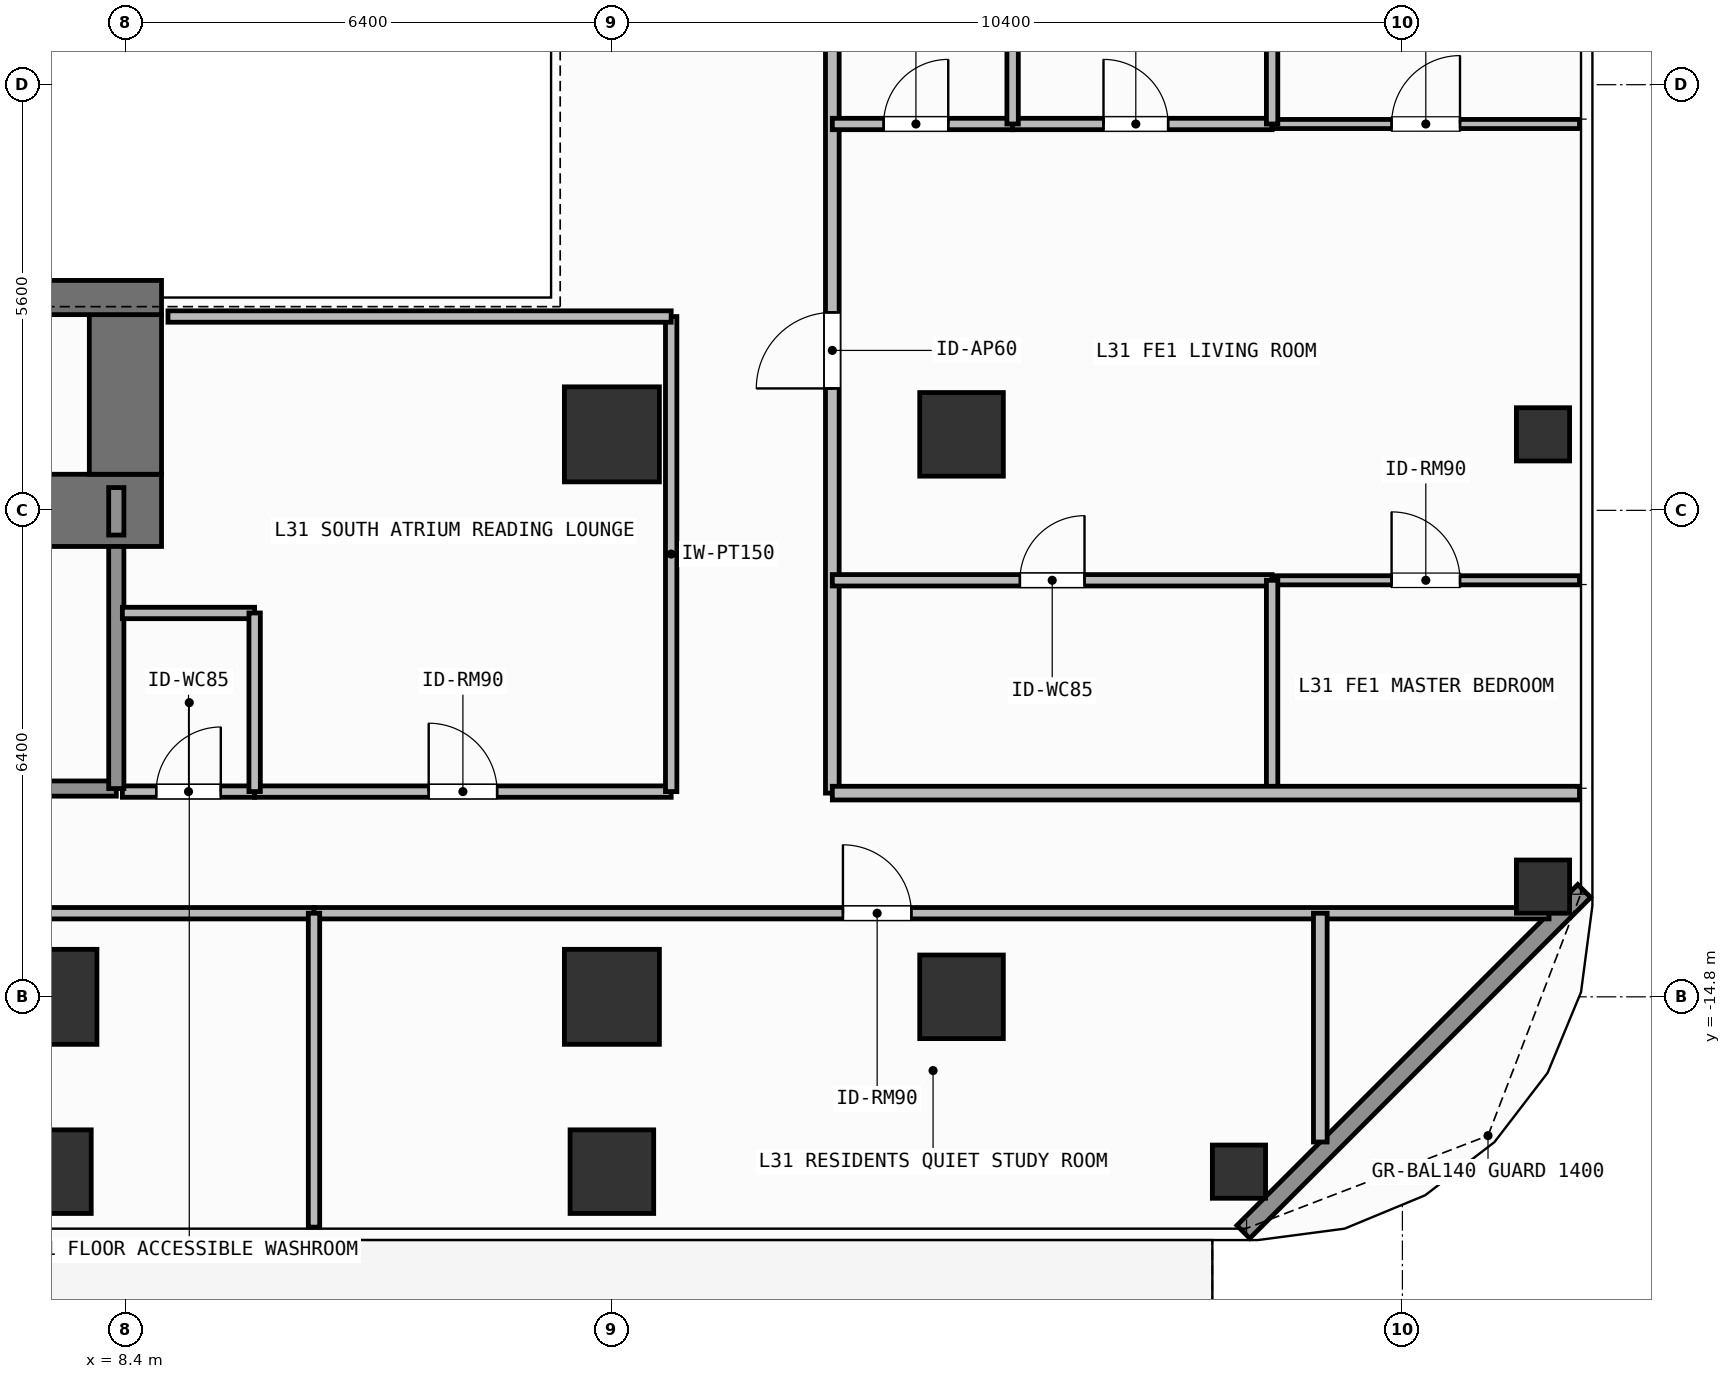
"""IFC4 building model, lengths in metres.
Left out: names, types, materials, properties, quantities, classifications, styles, units other than length and angle.
Written with IfcOpenShell. Run it as: python <this file> out.ifc"""

import sys

from ifc_helpers import new_model, si_unit, direction, frame, frame_2d, origin, origin_2d, place, context, subcontext, project, spatial, rectangle, hollow_rectangle, extrude, element, fill, save


model = new_model("IFC4")
c1 = context("Model", 3, precision=1e-05, world=origin(), true_north=direction((0.0, 1.0)))
c2 = subcontext(c1, "Body", "Model", "MODEL_VIEW")
j1 = project(units=[si_unit("LENGTHUNIT", "METRE"), si_unit("PLANEANGLEUNIT", "RADIAN")], contexts=[c1])
p1 = place(None, origin())
s1 = spatial("IfcSite", under=j1, at=p1, CompositionType="ELEMENT")
p2 = place(p1, origin())
s2 = spatial("IfcBuilding", under=s1, at=p2, CompositionType="ELEMENT")
p3 = place(p2, frame((0.0, 0.0, 125.1)))
s3 = spatial("IfcBuildingStorey", under=s2, at=p3, CompositionType="ELEMENT", Elevation=125.1)
p4 = place(p3, frame((6.12, -8.4, 0.0), z_axis=(0.0, 0.0, 1.0), x_axis=(1.0, 0.0, 0.0)))
e1 = element("IfcWall", 1, at=p4, inside=s3, PredefinedType="SHEAR", context=c2, shape_type="SweptSolid", body=[
    extrude(rectangle(XDim=2.755, YDim=0.95, at=frame_2d((1.377, 0.0))), origin(), (0.0, 0.0, 1.0), 3.9),
])
p5 = place(p3, frame((8.4, -7.925, 0.0), z_axis=(0.0, 0.0, 1.0), x_axis=(0.0, 1.0, 0.0)))
e2 = element("IfcWall", 2, at=p5, inside=s3, PredefinedType="SHEAR", context=c2, shape_type="SweptSolid", body=[
    extrude(rectangle(XDim=2.1, YDim=0.95, at=frame_2d((1.05, 0.0))), origin(), (0.0, 0.0, 1.0), 3.9),
])
p6 = place(p3, frame((3.045, -5.6, 0.0), z_axis=(0.0, 0.0, 1.0), x_axis=(1.0, 0.0, 0.0)))
e3 = element("IfcWall", 3, at=p6, inside=s3, PredefinedType="SHEAR", context=c2, shape_type="SweptSolid", body=[
    extrude(rectangle(XDim=5.83, YDim=0.45, at=frame_2d((2.915, 0.0))), origin(), (0.0, 0.0, 1.0), 3.9),
])
for number, where, z_axis, x_axis in (
    (4, (7.4, -14.8, 0.0), (0.0, 0.0, 1.0), (1.0, 0.0, 0.0)),
    (5, (14.8, -14.8, 0.0), (0.0, 0.0, 1.0), (1.0, 0.0, 0.0)),
    (6, (14.8, -7.4, 0.0), (0.0, 0.0, 1.0), (1.0, 0.0, 0.0)),
):
    element("IfcColumn", number, at=place(p3, frame(where, z_axis=z_axis, x_axis=x_axis)), inside=s3, PredefinedType="COLUMN", context=c2, shape_type="SweptSolid", body=[
        extrude(rectangle(XDim=1.25, YDim=1.25, at=origin_2d()), origin(), (0.0, 0.0, 1.0), 3.9),
    ])
for number, where, z_axis, x_axis in (
    (7, (19.4, -14.8, 0.0), (0.0, 0.0, 1.0), (1.0, 0.0, 0.0)),
    (8, (19.4, -7.4, 0.0), (0.0, 0.0, 1.0), (1.0, 0.0, 0.0)),
    (9, (7.4, -17.1, 0.0), (0.0, 0.0, 1.0), (1.0, 0.0, 0.0)),
    (10, (14.8, -17.1, 0.0), (0.0, 0.0, 1.0), (1.0, 0.0, 0.0)),
):
    element("IfcColumn", number, at=place(p3, frame(where, z_axis=z_axis, x_axis=x_axis)), inside=s3, PredefinedType="COLUMN", context=c2, shape_type="SweptSolid", body=[
        extrude(rectangle(XDim=1.1, YDim=1.1, at=origin_2d()), origin(), (0.0, 0.0, 1.0), 3.9),
    ])
for number, where, z_axis, x_axis in (
    (11, (23.05, -17.1, 0.0), (0.0, 0.0, 1.0), (1.0, 0.0, 0.0)),
    (12, (27.05, -13.35, 0.0), (0.0, 0.0, 1.0), (1.0, 0.0, 0.0)),
    (13, (27.05, -7.4, 0.0), (0.0, 0.0, 1.0), (1.0, 0.0, 0.0)),
):
    element("IfcColumn", number, at=place(p3, frame(where, z_axis=z_axis, x_axis=x_axis)), inside=s3, PredefinedType="COLUMN", context=c2, shape_type="SweptSolid", body=[
        extrude(hollow_rectangle(XDim=0.7, YDim=0.7, WallThickness=0.032, at=origin_2d()), origin(), (0.0, 0.0, 1.0), 3.9),
    ])
p7 = place(p3, frame((27.592, -13.408, 0.0), z_axis=(0.0, 0.0, 1.0), x_axis=(-0.707106781187, -0.707106781187, 0.0)))
e14 = element("IfcWall", 14, at=p7, inside=s3, PredefinedType="SOLIDWALL", context=c2, shape_type="SweptSolid", body=[
    extrude(rectangle(XDim=6.342, YDim=0.24, at=frame_2d((3.171, 0.0))), origin(), (0.0, 0.0, 1.0), 3.68),
])
p8 = place(p3, frame((4.58, -12.06, 0.0), z_axis=(0.0, 0.0, 1.0), x_axis=(1.0, 0.0, 0.0)))
e15 = element("IfcWall", 15, at=p8, inside=s3, PredefinedType="SOLIDWALL", context=c2, shape_type="SweptSolid", body=[
    extrude(rectangle(XDim=3.7, YDim=0.2, at=frame_2d((1.85, 0.0))), origin(), (0.0, 0.0, 1.0), 3.68),
])
p9 = place(p8, frame((1.212, 0.0, 0.0)))
e16 = element("IfcOpeningElement", 16, at=p9, cuts=e15, PredefinedType="OPENING", context=c2, shape_type="SweptSolid", body=[
    extrude(rectangle(XDim=1.1, YDim=2.15, at=frame_2d((0.55, 1.075))), frame((0.0, 0.11, 0.0), z_axis=(0.0, -1.0, 0.0), x_axis=(1.0, 0.0, 0.0)), (0.0, 0.0, 1.0), 0.22),
])
p10 = place(p3, frame((8.36, -12.1, 0.0), z_axis=(0.0, 0.0, 1.0), x_axis=(1.0, 0.0, 0.0)))
e17 = element("IfcWall", 17, at=p10, inside=s3, PredefinedType="PARTITIONING", context=c2, shape_type="SweptSolid", body=[
    extrude(rectangle(XDim=1.74, YDim=0.15, at=frame_2d((0.87, 0.0))), origin(), (0.0, 0.0, 1.0), 3.68),
])
p11 = place(p10, frame((0.445, 0.0, 0.0)))
e18 = element("IfcOpeningElement", 18, at=p11, cuts=e17, PredefinedType="OPENING", context=c2, shape_type="SweptSolid", body=[
    extrude(rectangle(XDim=0.85, YDim=2.1, at=frame_2d((0.425, 1.05))), frame((0.0, 0.085, 0.0), z_axis=(0.0, -1.0, 0.0), x_axis=(1.0, 0.0, 0.0)), (0.0, 0.0, 1.0), 0.17),
])
p12 = place(p3, frame((10.1, -12.1, 0.0), z_axis=(0.0, 0.0, 1.0), x_axis=(1.0, 0.0, 0.0)))
e19 = element("IfcWall", 19, at=p12, inside=s3, PredefinedType="PARTITIONING", context=c2, shape_type="SweptSolid", body=[
    extrude(rectangle(XDim=5.48, YDim=0.15, at=frame_2d((2.74, 0.0))), origin(), (0.0, 0.0, 1.0), 3.68),
])
p13 = place(p12, frame((2.29, 0.0, 0.0)))
e20 = element("IfcOpeningElement", 20, at=p13, cuts=e19, PredefinedType="OPENING", context=c2, shape_type="SweptSolid", body=[
    extrude(rectangle(XDim=0.9, YDim=2.1, at=frame_2d((0.45, 1.05))), frame((0.0, 0.085, 0.0), z_axis=(0.0, -1.0, 0.0), x_axis=(1.0, 0.0, 0.0)), (0.0, 0.0, 1.0), 0.17),
])
p14 = place(p3, frame((-2.15, -13.7, 0.0), z_axis=(0.0, 0.0, 1.0), x_axis=(1.0, 0.0, 0.0)))
e21 = element("IfcWall", 21, at=p14, inside=s3, PredefinedType="PARTITIONING", context=c2, shape_type="SweptSolid", body=[
    extrude(rectangle(XDim=13.031, YDim=0.15, at=frame_2d((6.516, 0.0))), origin(), (0.0, 0.0, 1.0), 3.68),
])
p15 = place(p14, frame((6.065, 0.0, 0.0)))
e22 = element("IfcOpeningElement", 22, at=p15, cuts=e21, PredefinedType="OPENING", context=c2, shape_type="SweptSolid", body=[
    extrude(rectangle(XDim=0.9, YDim=2.1, at=frame_2d((0.45, 1.05))), frame((0.0, 0.085, 0.0), z_axis=(0.0, -1.0, 0.0), x_axis=(1.0, 0.0, 0.0)), (0.0, 0.0, 1.0), 0.17),
])
p16 = place(p3, frame((10.881, -13.7, 0.0), z_axis=(0.0, 0.0, 1.0), x_axis=(1.0, 0.0, 0.0)))
e23 = element("IfcWall", 23, at=p16, inside=s3, PredefinedType="PARTITIONING", context=c2, shape_type="SweptSolid", body=[
    extrude(rectangle(XDim=16.249, YDim=0.15, at=frame_2d((8.125, 0.0))), origin(), (0.0, 0.0, 1.0), 3.68),
])
p17 = place(p16, frame((6.959, 0.0, 0.0)))
e24 = element("IfcOpeningElement", 24, at=p17, cuts=e23, PredefinedType="OPENING", context=c2, shape_type="SweptSolid", body=[
    extrude(rectangle(XDim=0.9, YDim=2.1, at=frame_2d((0.45, 1.05))), frame((0.0, 0.085, 0.0), z_axis=(0.0, -1.0, 0.0), x_axis=(1.0, 0.0, 0.0)), (0.0, 0.0, 1.0), 0.17),
])
p18 = place(p3, frame((17.7, -12.12, 0.0), z_axis=(0.0, 0.0, 1.0), x_axis=(0.0, 1.0, 0.0)))
e25 = element("IfcWall", 25, at=p18, inside=s3, PredefinedType="PARTITIONING", context=c2, shape_type="SweptSolid", body=[
    extrude(rectangle(XDim=13.429, YDim=0.18, at=frame_2d((6.715, 0.0))), origin(), (0.0, 0.0, 1.0), 3.68),
])
p19 = place(p18, frame((5.324, 0.0, 0.0)))
e26 = element("IfcOpeningElement", 26, at=p19, cuts=e25, PredefinedType="OPENING", context=c2, shape_type="SweptSolid", body=[
    extrude(rectangle(XDim=1.0, YDim=2.2, at=frame_2d((0.5, 1.1))), frame((0.0, 0.1, 0.0), z_axis=(0.0, -1.0, 0.0), x_axis=(1.0, 0.0, 0.0)), (0.0, 0.0, 1.0), 0.2),
])
p20 = place(p3, frame((17.7, -3.317, 0.0), z_axis=(0.0, 0.0, 1.0), x_axis=(1.0, 0.0, 0.0)))
e27 = element("IfcWall", 27, at=p20, inside=s3, PredefinedType="PARTITIONING", context=c2, shape_type="SweptSolid", body=[
    extrude(rectangle(XDim=2.372, YDim=0.15, at=frame_2d((1.186, 0.0))), origin(), (0.0, 0.0, 1.0), 3.68),
])
p21 = place(p20, frame((0.675, 0.0, 0.0)))
e28 = element("IfcOpeningElement", 28, at=p21, cuts=e27, PredefinedType="OPENING", context=c2, shape_type="SweptSolid", body=[
    extrude(rectangle(XDim=0.85, YDim=2.1, at=frame_2d((0.425, 1.05))), frame((0.0, 0.085, 0.0), z_axis=(0.0, -1.0, 0.0), x_axis=(1.0, 0.0, 0.0)), (0.0, 0.0, 1.0), 0.17),
])
p22 = place(p3, frame((20.072, -3.317, 0.0), z_axis=(0.0, 0.0, 1.0), x_axis=(1.0, 0.0, 0.0)))
e29 = element("IfcWall", 29, at=p22, inside=s3, PredefinedType="PARTITIONING", context=c2, shape_type="SweptSolid", body=[
    extrude(rectangle(XDim=3.414, YDim=0.15, at=frame_2d((1.707, 0.0))), origin(), (0.0, 0.0, 1.0), 3.68),
])
p23 = place(p22, frame((1.196, 0.0, 0.0)))
e30 = element("IfcOpeningElement", 30, at=p23, cuts=e29, PredefinedType="OPENING", context=c2, shape_type="SweptSolid", body=[
    extrude(rectangle(XDim=0.85, YDim=2.1, at=frame_2d((0.425, 1.05))), frame((0.0, 0.085, 0.0), z_axis=(0.0, -1.0, 0.0), x_axis=(1.0, 0.0, 0.0)), (0.0, 0.0, 1.0), 0.17),
])
p24 = place(p3, frame((17.7, -9.32, 0.0), z_axis=(0.0, 0.0, 1.0), x_axis=(1.0, 0.0, 0.0)))
e31 = element("IfcWall", 31, at=p24, inside=s3, PredefinedType="PARTITIONING", context=c2, shape_type="SweptSolid", body=[
    extrude(rectangle(XDim=5.786, YDim=0.15, at=frame_2d((2.893, 0.0))), origin(), (0.0, 0.0, 1.0), 3.68),
])
p25 = place(p24, frame((2.468, 0.0, 0.0)))
e32 = element("IfcOpeningElement", 32, at=p25, cuts=e31, PredefinedType="OPENING", context=c2, shape_type="SweptSolid", body=[
    extrude(rectangle(XDim=0.85, YDim=2.1, at=frame_2d((0.425, 1.05))), frame((0.0, 0.085, 0.0), z_axis=(0.0, -1.0, 0.0), x_axis=(1.0, 0.0, 0.0)), (0.0, 0.0, 1.0), 0.17),
])
p26 = place(p3, frame((23.486, -9.32, 0.0), z_axis=(0.0, 0.0, 1.0), x_axis=(1.0, 0.0, 0.0)))
e33 = element("IfcWall", 33, at=p26, inside=s3, PredefinedType="PARTITIONING", context=c2, shape_type="SweptSolid", body=[
    extrude(rectangle(XDim=4.044, YDim=0.12, at=frame_2d((2.022, 0.0))), origin(), (0.0, 0.0, 1.0), 3.68),
])
p27 = place(p26, frame((1.572, 0.0, 0.0)))
e34 = element("IfcOpeningElement", 34, at=p27, cuts=e33, PredefinedType="OPENING", context=c2, shape_type="SweptSolid", body=[
    extrude(rectangle(XDim=0.9, YDim=2.1, at=frame_2d((0.45, 1.05))), frame((0.0, 0.07, 0.0), z_axis=(0.0, -1.0, 0.0), x_axis=(1.0, 0.0, 0.0)), (0.0, 0.0, 1.0), 0.14),
])
p28 = place(p3, frame((23.486, -3.317, 0.0), z_axis=(0.0, 0.0, 1.0), x_axis=(1.0, 0.0, 0.0)))
e35 = element("IfcWall", 35, at=p28, inside=s3, PredefinedType="PARTITIONING", context=c2, shape_type="SweptSolid", body=[
    extrude(rectangle(XDim=4.044, YDim=0.12, at=frame_2d((2.022, 0.0))), origin(), (0.0, 0.0, 1.0), 3.68),
])
p29 = place(p28, frame((1.572, 0.0, 0.0)))
e36 = element("IfcOpeningElement", 36, at=p29, cuts=e35, PredefinedType="OPENING", context=c2, shape_type="SweptSolid", body=[
    extrude(rectangle(XDim=0.9, YDim=2.1, at=frame_2d((0.45, 1.05))), frame((0.0, 0.07, 0.0), z_axis=(0.0, -1.0, 0.0), x_axis=(1.0, 0.0, 0.0)), (0.0, 0.0, 1.0), 0.14),
])
p30 = place(p3, frame((8.28, -12.06, 0.0), z_axis=(0.0, 0.0, 1.0), x_axis=(0.0, 1.0, 0.0)))
e37 = element("IfcWall", 37, at=p30, inside=s3, PredefinedType="SOLIDWALL", context=c2, shape_type="SweptSolid", body=[
    extrude(rectangle(XDim=3.185, YDim=0.2, at=frame_2d((1.593, 0.0))), origin(), (0.0, 0.0, 1.0), 3.68),
])
p31 = place(p3, frame((8.28, -8.725, 0.0), z_axis=(0.0, 0.0, 1.0), x_axis=(0.0, 1.0, 0.0)))
e38 = element("IfcWall", 38, at=p31, inside=s3, PredefinedType="SOLIDWALL", context=c2, shape_type="SweptSolid", body=[
    extrude(rectangle(XDim=0.625, YDim=0.2, at=frame_2d((0.312, 0.0))), origin(), (0.0, 0.0, 1.0), 3.68),
])
p32 = place(p3, frame((8.36, -9.75, 0.0), z_axis=(0.0, 0.0, 1.0), x_axis=(1.0, 0.0, 0.0)))
e39 = element("IfcWall", 39, at=p32, inside=s3, PredefinedType="PARTITIONING", context=c2, shape_type="SweptSolid", body=[
    extrude(rectangle(XDim=1.74, YDim=0.15, at=frame_2d((0.87, 0.0))), origin(), (0.0, 0.0, 1.0), 3.68),
])
p33 = place(p3, frame((10.1, -12.1, 0.0), z_axis=(0.0, 0.0, 1.0), x_axis=(0.0, 1.0, 0.0)))
e40 = element("IfcWall", 40, at=p33, inside=s3, PredefinedType="PARTITIONING", context=c2, shape_type="SweptSolid", body=[
    extrude(rectangle(XDim=2.35, YDim=0.15, at=frame_2d((1.175, 0.0))), origin(), (0.0, 0.0, 1.0), 3.68),
])
p34 = place(p3, frame((15.58, -12.1, 0.0), z_axis=(0.0, 0.0, 1.0), x_axis=(0.0, 1.0, 0.0)))
e41 = element("IfcWall", 41, at=p34, inside=s3, PredefinedType="PARTITIONING", context=c2, shape_type="SweptSolid", body=[
    extrude(rectangle(XDim=6.25, YDim=0.15, at=frame_2d((3.125, 0.0))), origin(), (0.0, 0.0, 1.0), 3.68),
])
p35 = place(p3, frame((8.96, -5.85, 0.0), z_axis=(0.0, 0.0, 1.0), x_axis=(1.0, 0.0, 0.0)))
e42 = element("IfcWall", 42, at=p35, inside=s3, PredefinedType="PARTITIONING", context=c2, shape_type="SweptSolid", body=[
    extrude(rectangle(XDim=6.62, YDim=0.15, at=frame_2d((3.31, 0.0))), origin(), (0.0, 0.0, 1.0), 3.68),
])
p36 = place(p3, frame((24.12, -16.71, 0.0), z_axis=(0.0, 0.0, 1.0), x_axis=(0.0, 1.0, 0.0)))
e43 = element("IfcWall", 43, at=p36, inside=s3, PredefinedType="PARTITIONING", context=c2, shape_type="SweptSolid", body=[
    extrude(rectangle(XDim=3.01, YDim=0.18, at=frame_2d((1.505, 0.0))), origin(), (0.0, 0.0, 1.0), 3.68),
])
p37 = place(p3, frame((10.881, -17.83, 0.0), z_axis=(0.0, 0.0, 1.0), x_axis=(0.0, 1.0, 0.0)))
e44 = element("IfcWall", 44, at=p37, inside=s3, PredefinedType="PARTITIONING", context=c2, shape_type="SweptSolid", body=[
    extrude(rectangle(XDim=4.13, YDim=0.15, at=frame_2d((2.065, 0.0))), origin(), (0.0, 0.0, 1.0), 3.68),
])
p38 = place(p3, frame((20.072, -3.317, 0.0), z_axis=(0.0, 0.0, 1.0), x_axis=(0.0, 1.0, 0.0)))
e45 = element("IfcWall", 45, at=p38, inside=s3, PredefinedType="PARTITIONING", context=c2, shape_type="SweptSolid", body=[
    extrude(rectangle(XDim=4.626, YDim=0.15, at=frame_2d((2.313, 0.0))), origin(), (0.0, 0.0, 1.0), 3.68),
])
p39 = place(p3, frame((23.486, -12.12, 0.0), z_axis=(0.0, 0.0, 1.0), x_axis=(0.0, 1.0, 0.0)))
e46 = element("IfcWall", 46, at=p39, inside=s3, PredefinedType="PARTITIONING", context=c2, shape_type="SweptSolid", body=[
    extrude(rectangle(XDim=2.8, YDim=0.15, at=frame_2d((1.4, 0.0))), origin(), (0.0, 0.0, 1.0), 3.68),
])
p40 = place(p3, frame((23.486, -3.317, 0.0), z_axis=(0.0, 0.0, 1.0), x_axis=(0.0, 1.0, 0.0)))
e47 = element("IfcWall", 47, at=p40, inside=s3, PredefinedType="PARTITIONING", context=c2, shape_type="SweptSolid", body=[
    extrude(rectangle(XDim=4.626, YDim=0.15, at=frame_2d((2.313, 0.0))), origin(), (0.0, 0.0, 1.0), 3.68),
])
p41 = place(p3, frame((17.7, -12.12, 0.0), z_axis=(0.0, 0.0, 1.0), x_axis=(1.0, 0.0, 0.0)))
e48 = element("IfcWall", 48, at=p41, inside=s3, PredefinedType="PARTITIONING", context=c2, shape_type="SweptSolid", body=[
    extrude(rectangle(XDim=9.83, YDim=0.18, at=frame_2d((4.915, 0.0))), origin(), (0.0, 0.0, 1.0), 3.68),
])
p42 = place(p11, origin())
e49 = element("IfcDoor", 49, at=p42, inside=s3, OperationType="SINGLE_SWING_RIGHT", PredefinedType="DOOR", context=c2, shape_type="SweptSolid", body=[
    extrude(rectangle(XDim=0.85, YDim=2.1, at=frame_2d((0.425, 1.05))), frame((0.0, 0.025, 0.0), z_axis=(0.0, -1.0, 0.0), x_axis=(1.0, 0.0, 0.0)), (0.0, 0.0, 1.0), 0.05),
])
fill(e18, e49)
p43 = place(p13, origin())
e50 = element("IfcDoor", 50, at=p43, inside=s3, OperationType="SINGLE_SWING_LEFT", PredefinedType="DOOR", context=c2, shape_type="SweptSolid", body=[
    extrude(rectangle(XDim=0.9, YDim=2.1, at=frame_2d((0.45, 1.05))), frame((0.0, 0.025, 0.0), z_axis=(0.0, -1.0, 0.0), x_axis=(1.0, 0.0, 0.0)), (0.0, 0.0, 1.0), 0.05),
])
fill(e20, e50)
p44 = place(p17, origin())
e51 = element("IfcDoor", 51, at=p44, inside=s3, OperationType="SINGLE_SWING_LEFT", PredefinedType="DOOR", context=c2, shape_type="SweptSolid", body=[
    extrude(rectangle(XDim=0.9, YDim=2.1, at=frame_2d((0.45, 1.05))), frame((0.0, 0.025, 0.0), z_axis=(0.0, -1.0, 0.0), x_axis=(1.0, 0.0, 0.0)), (0.0, 0.0, 1.0), 0.05),
])
fill(e24, e51)
p45 = place(p19, origin())
e52 = element("IfcDoor", 52, at=p45, inside=s3, OperationType="SINGLE_SWING_LEFT", PredefinedType="DOOR", context=c2, shape_type="SweptSolid", body=[
    extrude(rectangle(XDim=1.0, YDim=2.2, at=frame_2d((0.5, 1.1))), frame((0.0, 0.025, 0.0), z_axis=(0.0, -1.0, 0.0), x_axis=(1.0, 0.0, 0.0)), (0.0, 0.0, 1.0), 0.05),
])
fill(e26, e52)
p46 = place(p21, origin())
e53 = element("IfcDoor", 53, at=p46, inside=s3, OperationType="SINGLE_SWING_RIGHT", PredefinedType="DOOR", context=c2, shape_type="SweptSolid", body=[
    extrude(rectangle(XDim=0.85, YDim=2.1, at=frame_2d((0.425, 1.05))), frame((0.0, 0.025, 0.0), z_axis=(0.0, -1.0, 0.0), x_axis=(1.0, 0.0, 0.0)), (0.0, 0.0, 1.0), 0.05),
])
fill(e28, e53)
p47 = place(p23, origin())
e54 = element("IfcDoor", 54, at=p47, inside=s3, OperationType="SINGLE_SWING_LEFT", PredefinedType="DOOR", context=c2, shape_type="SweptSolid", body=[
    extrude(rectangle(XDim=0.85, YDim=2.1, at=frame_2d((0.425, 1.05))), frame((0.0, 0.025, 0.0), z_axis=(0.0, -1.0, 0.0), x_axis=(1.0, 0.0, 0.0)), (0.0, 0.0, 1.0), 0.05),
])
fill(e30, e54)
p48 = place(p25, origin())
e55 = element("IfcDoor", 55, at=p48, inside=s3, OperationType="SINGLE_SWING_RIGHT", PredefinedType="DOOR", context=c2, shape_type="SweptSolid", body=[
    extrude(rectangle(XDim=0.85, YDim=2.1, at=frame_2d((0.425, 1.05))), frame((0.0, 0.025, 0.0), z_axis=(0.0, -1.0, 0.0), x_axis=(1.0, 0.0, 0.0)), (0.0, 0.0, 1.0), 0.05),
])
fill(e32, e55)
p49 = place(p27, origin())
e56 = element("IfcDoor", 56, at=p49, inside=s3, OperationType="SINGLE_SWING_LEFT", PredefinedType="DOOR", context=c2, shape_type="SweptSolid", body=[
    extrude(rectangle(XDim=0.9, YDim=2.1, at=frame_2d((0.45, 1.05))), frame((0.0, 0.025, 0.0), z_axis=(0.0, -1.0, 0.0), x_axis=(1.0, 0.0, 0.0)), (0.0, 0.0, 1.0), 0.05),
])
fill(e34, e56)
p50 = place(p29, origin())
e57 = element("IfcDoor", 57, at=p50, inside=s3, OperationType="SINGLE_SWING_RIGHT", PredefinedType="DOOR", context=c2, shape_type="SweptSolid", body=[
    extrude(rectangle(XDim=0.9, YDim=2.1, at=frame_2d((0.45, 1.05))), frame((0.0, 0.025, 0.0), z_axis=(0.0, -1.0, 0.0), x_axis=(1.0, 0.0, 0.0)), (0.0, 0.0, 1.0), 0.05),
])
fill(e36, e57)
save(model, sys.argv[1])
